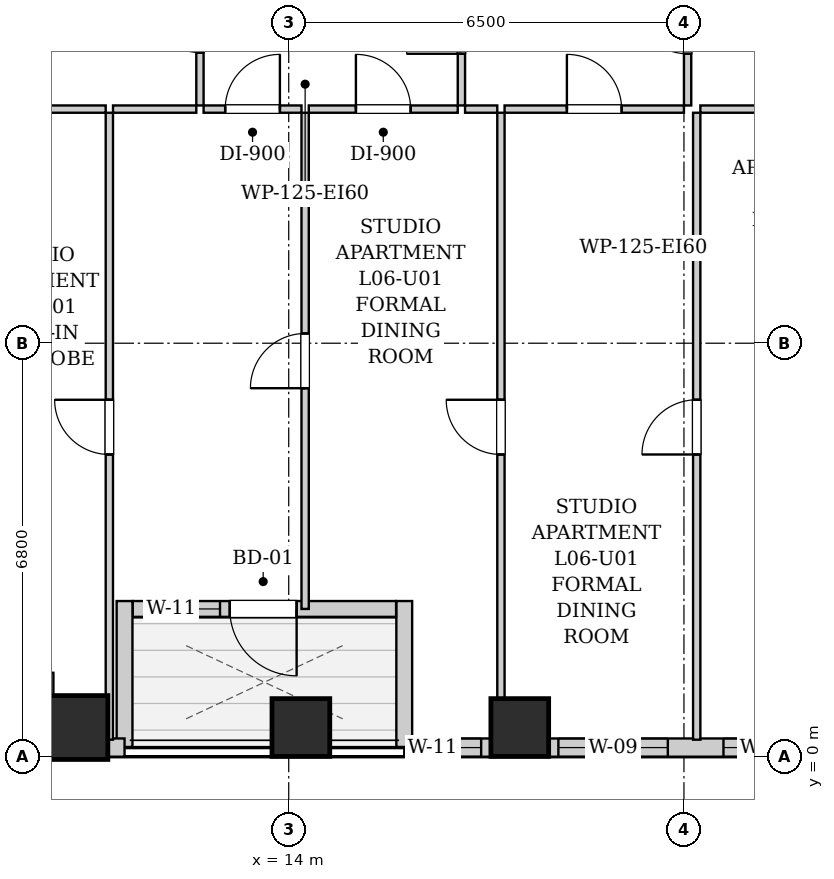
"""IFC4 building model, lengths in metres.
Left out: names, types, materials, properties, quantities, classifications, styles, units other than length and angle.
Written with IfcOpenShell. Run it as: python <this file> out.ifc"""

import sys

from ifc_helpers import new_model, si_unit, direction, frame, frame_2d, origin, origin_2d, place, context, subcontext, project, spatial, rectangle, extrude, element, fill, save


model = new_model("IFC4")
c1 = context("Model", 3, precision=1e-05, world=origin(), true_north=direction((0.0, 1.0)))
c2 = subcontext(c1, "Body", "Model", "MODEL_VIEW")
j1 = project(units=[si_unit("LENGTHUNIT", "METRE"), si_unit("PLANEANGLEUNIT", "RADIAN")], contexts=[c1])
p1 = place(None, origin())
s1 = spatial("IfcSite", under=j1, at=p1, CompositionType="ELEMENT")
p2 = place(p1, origin())
s2 = spatial("IfcBuilding", under=s1, at=p2, CompositionType="ELEMENT")
p3 = place(p2, frame((0.0, 0.0, 29.0)))
s3 = spatial("IfcBuildingStorey", under=s2, at=p3, CompositionType="ELEMENT", Elevation=29.0)
p4 = place(p3, frame((10.5, 0.48, 0.0), z_axis=(0.0, 0.0, 1.0), x_axis=(1.0, 0.0, 0.0)))
e1 = element("IfcColumn", 1, at=p4, inside=s3, PredefinedType="COLUMN", context=c2, shape_type="SweptSolid", body=[
    extrude(rectangle(XDim=1.05, YDim=1.05, at=origin_2d()), origin(), (0.0, 0.0, 1.0), 3.2),
])
for number, where, z_axis, x_axis in (
    (2, (14.2, 0.48, 0.0), (0.0, 0.0, 1.0), (1.0, 0.0, 0.0)),
    (3, (17.8, 0.48, 0.0), (0.0, 0.0, 1.0), (1.0, 0.0, 0.0)),
):
    element("IfcColumn", number, at=place(p3, frame(where, z_axis=z_axis, x_axis=x_axis)), inside=s3, PredefinedType="COLUMN", context=c2, shape_type="SweptSolid", body=[
        extrude(rectangle(XDim=0.95, YDim=0.95, at=origin_2d()), origin(), (0.0, 0.0, 1.0), 3.2),
    ])
p5 = place(p3, frame((44.0, 0.15, 0.0), z_axis=(0.0, 0.0, 1.0), x_axis=(-1.0, 0.0, 0.0)))
e4 = element("IfcWall", 4, at=p5, inside=s3, PredefinedType="SOLIDWALL", context=c2, shape_type="SweptSolid", body=[
    extrude(rectangle(XDim=28.1, YDim=0.3, at=frame_2d((14.05, 0.0))), origin(), (0.0, 0.0, 1.0), 1.975),
])
p6 = place(p5, frame((26.835, 0.0, 0.55)))
e5 = element("IfcOpeningElement", 5, at=p6, cuts=e4, PredefinedType="OPENING", context=c2, shape_type="SweptSolid", body=[
    extrude(rectangle(XDim=0.85, YDim=1.2, at=frame_2d((0.425, 0.6))), frame((0.0, 0.16, 0.0), z_axis=(0.0, -1.0, 0.0), x_axis=(1.0, 0.0, 0.0)), (0.0, 0.0, 1.0), 0.32),
])
p7 = place(p5, frame((23.765, 0.0, 0.55)))
e6 = element("IfcOpeningElement", 6, at=p7, cuts=e4, PredefinedType="OPENING", context=c2, shape_type="SweptSolid", body=[
    extrude(rectangle(XDim=1.8, YDim=1.2, at=frame_2d((0.9, 0.6))), frame((0.0, 0.16, 0.0), z_axis=(0.0, -1.0, 0.0), x_axis=(1.0, 0.0, 0.0)), (0.0, 0.0, 1.0), 0.32),
])
p8 = place(p5, frame((21.5, 0.0, 0.55)))
e7 = element("IfcOpeningElement", 7, at=p8, cuts=e4, PredefinedType="OPENING", context=c2, shape_type="SweptSolid", body=[
    extrude(rectangle(XDim=1.35, YDim=1.2, at=frame_2d((0.675, 0.6))), frame((0.0, 0.16, 0.0), z_axis=(0.0, -1.0, 0.0), x_axis=(1.0, 0.0, 0.0)), (0.0, 0.0, 1.0), 0.32),
])
p9 = place(p5, frame((14.352, 0.0, 0.55)))
e8 = element("IfcOpeningElement", 8, at=p9, cuts=e4, PredefinedType="OPENING", context=c2, shape_type="SweptSolid", body=[
    extrude(rectangle(XDim=1.8, YDim=1.2, at=frame_2d((0.9, 0.6))), frame((0.0, 0.16, 0.0), z_axis=(0.0, -1.0, 0.0), x_axis=(1.0, 0.0, 0.0)), (0.0, 0.0, 1.0), 0.32),
])
p10 = place(p5, frame((11.435, 0.0, 0.55)))
e9 = element("IfcOpeningElement", 9, at=p10, cuts=e4, PredefinedType="OPENING", context=c2, shape_type="SweptSolid", body=[
    extrude(rectangle(XDim=1.8, YDim=1.2, at=frame_2d((0.9, 0.6))), frame((0.0, 0.16, 0.0), z_axis=(0.0, -1.0, 0.0), x_axis=(1.0, 0.0, 0.0)), (0.0, 0.0, 1.0), 0.32),
])
p11 = place(p5, frame((7.891, 0.0, 0.55)))
e10 = element("IfcOpeningElement", 10, at=p11, cuts=e4, PredefinedType="OPENING", context=c2, shape_type="SweptSolid", body=[
    extrude(rectangle(XDim=1.8, YDim=1.2, at=frame_2d((0.9, 0.6))), frame((0.0, 0.16, 0.0), z_axis=(0.0, -1.0, 0.0), x_axis=(1.0, 0.0, 0.0)), (0.0, 0.0, 1.0), 0.32),
])
p12 = place(p5, frame((4.315, 0.0, 0.55)))
e11 = element("IfcOpeningElement", 11, at=p12, cuts=e4, PredefinedType="OPENING", context=c2, shape_type="SweptSolid", body=[
    extrude(rectangle(XDim=0.85, YDim=1.2, at=frame_2d((0.425, 0.6))), frame((0.0, 0.16, 0.0), z_axis=(0.0, -1.0, 0.0), x_axis=(1.0, 0.0, 0.0)), (0.0, 0.0, 1.0), 0.32),
])
p13 = place(p3, frame((15.9, 0.16, 0.0), z_axis=(0.0, 0.0, 1.0), x_axis=(0.0, 1.0, 0.0)))
e12 = element("IfcWall", 12, at=p13, inside=s3, PredefinedType="SOLIDWALL", context=c2, shape_type="SweptSolid", body=[
    extrude(rectangle(XDim=2.4, YDim=0.26, at=frame_2d((1.2, 0.0))), origin(), (0.0, 0.0, 1.0), 2.94),
])
p14 = place(p3, frame((15.766, 2.43, 0.0), z_axis=(0.0, 0.0, 1.0), x_axis=(-1.0, 0.0, 0.0)))
e13 = element("IfcWall", 13, at=p14, inside=s3, PredefinedType="SOLIDWALL", context=c2, shape_type="SweptSolid", body=[
    extrude(rectangle(XDim=4.332, YDim=0.26, at=frame_2d((2.166, 0.0))), origin(), (0.0, 0.0, 1.0), 2.94),
])
p15 = place(p14, frame((1.636, 0.0, 0.0)))
e14 = element("IfcOpeningElement", 14, at=p15, cuts=e13, PredefinedType="OPENING", context=c2, shape_type="SweptSolid", body=[
    extrude(rectangle(XDim=1.1, YDim=2.0, at=frame_2d((0.55, 1.0))), frame((0.0, 0.14, 0.0), z_axis=(0.0, -1.0, 0.0), x_axis=(1.0, 0.0, 0.0)), (0.0, 0.0, 1.0), 0.28),
])
p16 = place(p14, frame((2.896, 0.0, 0.55)))
e15 = element("IfcOpeningElement", 15, at=p16, cuts=e13, PredefinedType="OPENING", context=c2, shape_type="SweptSolid", body=[
    extrude(rectangle(XDim=0.85, YDim=1.2, at=frame_2d((0.425, 0.6))), frame((0.0, 0.14, 0.0), z_axis=(0.0, -1.0, 0.0), x_axis=(1.0, 0.0, 0.0)), (0.0, 0.0, 1.0), 0.28),
])
p17 = place(p3, frame((11.3, 2.56, 0.0), z_axis=(0.0, 0.0, 1.0), x_axis=(0.0, -1.0, 0.0)))
e16 = element("IfcWall", 16, at=p17, inside=s3, PredefinedType="SOLIDWALL", context=c2, shape_type="SweptSolid", body=[
    extrude(rectangle(XDim=2.4, YDim=0.26, at=frame_2d((1.2, 0.0))), origin(), (0.0, 0.0, 1.0), 2.94),
])
p18 = place(p3, frame((11.3, 0.15, 0.0), z_axis=(0.0, 0.0, 1.0), x_axis=(-1.0, 0.0, 0.0)))
e17 = element("IfcWall", 17, at=p18, inside=s3, PredefinedType="SOLIDWALL", context=c2, shape_type="SweptSolid", body=[
    extrude(rectangle(XDim=1.3, YDim=0.3, at=frame_2d((0.65, 0.0))), origin(), (0.0, 0.0, 1.0), 1.975),
])
p19 = place(p3, frame((10.0, 0.302, 0.0), z_axis=(0.0, 0.0, 1.0), x_axis=(0.0, 1.0, 0.0)))
e18 = element("IfcWall", 18, at=p19, inside=s3, PredefinedType="SOLIDWALL", context=c2, shape_type="SweptSolid", body=[
    extrude(rectangle(XDim=1.078, YDim=0.26, at=frame_2d((0.539, 0.0))), origin(), (0.0, 0.0, 1.0), 2.94),
])
p20 = place(p3, frame((12.54, 10.71, 0.0), z_axis=(0.0, 0.0, 1.0), x_axis=(0.0, 1.0, 0.0)))
e19 = element("IfcWall", 19, at=p20, inside=s3, PredefinedType="PARTITIONING", context=c2, shape_type="SweptSolid", body=[
    extrude(rectangle(XDim=2.6, YDim=0.12, at=frame_2d((1.3, 0.0))), origin(), (0.0, 0.0, 1.0), 2.94),
])
p21 = place(p20, frame((0.87, 0.0, 0.0)))
e20 = element("IfcOpeningElement", 20, at=p21, cuts=e19, PredefinedType="OPENING", context=c2, shape_type="SweptSolid", body=[
    extrude(rectangle(XDim=0.86, YDim=2.05, at=frame_2d((0.43, 1.025))), frame((0.0, 0.07, 0.0), z_axis=(0.0, -1.0, 0.0), x_axis=(1.0, 0.0, 0.0)), (0.0, 0.0, 1.0), 0.14),
])
p22 = place(p3, frame((10.08, 10.65, 0.0), z_axis=(0.0, 0.0, 1.0), x_axis=(1.0, 0.0, 0.0)))
e21 = element("IfcWall", 21, at=p22, inside=s3, PredefinedType="PARTITIONING", context=c2, shape_type="SweptSolid", body=[
    extrude(rectangle(XDim=0.91, YDim=0.12, at=frame_2d((0.455, 0.0))), origin(), (0.0, 0.0, 1.0), 2.94),
])
p23 = place(p3, frame((11.11, 10.65, 0.0), z_axis=(0.0, 0.0, 1.0), x_axis=(1.0, 0.0, 0.0)))
e22 = element("IfcWall", 22, at=p23, inside=s3, PredefinedType="PARTITIONING", context=c2, shape_type="SweptSolid", body=[
    extrude(rectangle(XDim=1.37, YDim=0.12, at=frame_2d((0.685, 0.0))), origin(), (0.0, 0.0, 1.0), 2.94),
])
p24 = place(p3, frame((16.84, 10.71, 0.0), z_axis=(0.0, 0.0, 1.0), x_axis=(0.0, 1.0, 0.0)))
e23 = element("IfcWall", 23, at=p24, inside=s3, PredefinedType="PARTITIONING", context=c2, shape_type="SweptSolid", body=[
    extrude(rectangle(XDim=2.6, YDim=0.12, at=frame_2d((1.3, 0.0))), origin(), (0.0, 0.0, 1.0), 2.94),
])
p25 = place(p24, frame((0.85, 0.0, 0.0)))
e24 = element("IfcOpeningElement", 24, at=p25, cuts=e23, PredefinedType="OPENING", context=c2, shape_type="SweptSolid", body=[
    extrude(rectangle(XDim=0.9, YDim=2.05, at=frame_2d((0.45, 1.025))), frame((0.0, 0.07, 0.0), z_axis=(0.0, -1.0, 0.0), x_axis=(1.0, 0.0, 0.0)), (0.0, 0.0, 1.0), 0.14),
])
p26 = place(p3, frame((12.6, 10.65, 0.0), z_axis=(0.0, 0.0, 1.0), x_axis=(1.0, 0.0, 0.0)))
e25 = element("IfcWall", 25, at=p26, inside=s3, PredefinedType="PARTITIONING", context=c2, shape_type="SweptSolid", body=[
    extrude(rectangle(XDim=1.61, YDim=0.12, at=frame_2d((0.805, 0.0))), origin(), (0.0, 0.0, 1.0), 2.94),
])
p27 = place(p26, frame((0.355, 0.0, 0.0)))
e26 = element("IfcOpeningElement", 26, at=p27, cuts=e25, PredefinedType="OPENING", context=c2, shape_type="SweptSolid", body=[
    extrude(rectangle(XDim=0.9, YDim=2.05, at=frame_2d((0.45, 1.025))), frame((0.0, 0.07, 0.0), z_axis=(0.0, -1.0, 0.0), x_axis=(1.0, 0.0, 0.0)), (0.0, 0.0, 1.0), 0.14),
])
p28 = place(p3, frame((14.33, 10.65, 0.0), z_axis=(0.0, 0.0, 1.0), x_axis=(1.0, 0.0, 0.0)))
e27 = element("IfcWall", 27, at=p28, inside=s3, PredefinedType="PARTITIONING", context=c2, shape_type="SweptSolid", body=[
    extrude(rectangle(XDim=2.45, YDim=0.12, at=frame_2d((1.225, 0.0))), origin(), (0.0, 0.0, 1.0), 2.94),
])
p29 = place(p28, frame((0.775, 0.0, 0.0)))
e28 = element("IfcOpeningElement", 28, at=p29, cuts=e27, PredefinedType="OPENING", context=c2, shape_type="SweptSolid", body=[
    extrude(rectangle(XDim=0.9, YDim=2.05, at=frame_2d((0.45, 1.025))), frame((0.0, 0.07, 0.0), z_axis=(0.0, -1.0, 0.0), x_axis=(1.0, 0.0, 0.0)), (0.0, 0.0, 1.0), 0.14),
])
p30 = place(p3, frame((20.56, 10.71, 0.0), z_axis=(0.0, 0.0, 1.0), x_axis=(0.0, 1.0, 0.0)))
e29 = element("IfcWall", 29, at=p30, inside=s3, PredefinedType="PARTITIONING", context=c2, shape_type="SweptSolid", body=[
    extrude(rectangle(XDim=2.6, YDim=0.12, at=frame_2d((1.3, 0.0))), origin(), (0.0, 0.0, 1.0), 2.94),
])
p31 = place(p30, frame((0.85, 0.0, 0.0)))
e30 = element("IfcOpeningElement", 30, at=p31, cuts=e29, PredefinedType="OPENING", context=c2, shape_type="SweptSolid", body=[
    extrude(rectangle(XDim=0.9, YDim=2.05, at=frame_2d((0.45, 1.025))), frame((0.0, 0.07, 0.0), z_axis=(0.0, -1.0, 0.0), x_axis=(1.0, 0.0, 0.0)), (0.0, 0.0, 1.0), 0.14),
])
p32 = place(p3, frame((16.9, 10.65, 0.0), z_axis=(0.0, 0.0, 1.0), x_axis=(1.0, 0.0, 0.0)))
e31 = element("IfcWall", 31, at=p32, inside=s3, PredefinedType="PARTITIONING", context=c2, shape_type="SweptSolid", body=[
    extrude(rectangle(XDim=0.53, YDim=0.12, at=frame_2d((0.265, 0.0))), origin(), (0.0, 0.0, 1.0), 2.94),
])
p33 = place(p3, frame((17.55, 10.65, 0.0), z_axis=(0.0, 0.0, 1.0), x_axis=(1.0, 0.0, 0.0)))
e32 = element("IfcWall", 32, at=p33, inside=s3, PredefinedType="PARTITIONING", context=c2, shape_type="SweptSolid", body=[
    extrude(rectangle(XDim=2.95, YDim=0.12, at=frame_2d((1.475, 0.0))), origin(), (0.0, 0.0, 1.0), 2.94),
])
p34 = place(p33, frame((1.025, 0.0, 0.0)))
e33 = element("IfcOpeningElement", 33, at=p34, cuts=e32, PredefinedType="OPENING", context=c2, shape_type="SweptSolid", body=[
    extrude(rectangle(XDim=0.9, YDim=2.05, at=frame_2d((0.45, 1.025))), frame((0.0, 0.07, 0.0), z_axis=(0.0, -1.0, 0.0), x_axis=(1.0, 0.0, 0.0)), (0.0, 0.0, 1.0), 0.14),
])
p35 = place(p3, frame((20.77, 10.65, 0.0), z_axis=(0.0, 0.0, 1.0), x_axis=(1.0, 0.0, 0.0)))
e34 = element("IfcWall", 34, at=p35, inside=s3, PredefinedType="PARTITIONING", context=c2, shape_type="SweptSolid", body=[
    extrude(rectangle(XDim=3.0, YDim=0.12, at=frame_2d((1.5, 0.0))), origin(), (0.0, 0.0, 1.0), 2.94),
])
p36 = place(p35, frame((1.05, 0.0, 0.0)))
e35 = element("IfcOpeningElement", 35, at=p36, cuts=e34, PredefinedType="OPENING", context=c2, shape_type="SweptSolid", body=[
    extrude(rectangle(XDim=0.9, YDim=2.05, at=frame_2d((0.45, 1.025))), frame((0.0, 0.07, 0.0), z_axis=(0.0, -1.0, 0.0), x_axis=(1.0, 0.0, 0.0)), (0.0, 0.0, 1.0), 0.14),
])
p37 = place(p3, frame((11.05, 0.28, 0.0), z_axis=(0.0, 0.0, 1.0), x_axis=(0.0, 1.0, 0.0)))
e36 = element("IfcWall", 36, at=p37, inside=s3, PredefinedType="PARTITIONING", context=c2, shape_type="SweptSolid", body=[
    extrude(rectangle(XDim=10.31, YDim=0.12, at=frame_2d((5.155, 0.0))), origin(), (0.0, 0.0, 1.0), 2.94),
])
p38 = place(p37, frame((4.69, 0.0, 0.0)))
e37 = element("IfcOpeningElement", 37, at=p38, cuts=e36, PredefinedType="OPENING", context=c2, shape_type="SweptSolid", body=[
    extrude(rectangle(XDim=0.9, YDim=2.05, at=frame_2d((0.45, 1.025))), frame((0.0, 0.07, 0.0), z_axis=(0.0, -1.0, 0.0), x_axis=(1.0, 0.0, 0.0)), (0.0, 0.0, 1.0), 0.14),
])
p39 = place(p3, frame((14.27, 2.43, 0.0), z_axis=(0.0, 0.0, 1.0), x_axis=(0.0, 1.0, 0.0)))
e38 = element("IfcWall", 38, at=p39, inside=s3, PredefinedType="PARTITIONING", context=c2, shape_type="SweptSolid", body=[
    extrude(rectangle(XDim=8.16, YDim=0.12, at=frame_2d((4.08, 0.0))), origin(), (0.0, 0.0, 1.0), 2.94),
])
p40 = place(p39, frame((3.63, 0.0, 0.0)))
e39 = element("IfcOpeningElement", 39, at=p40, cuts=e38, PredefinedType="OPENING", context=c2, shape_type="SweptSolid", body=[
    extrude(rectangle(XDim=0.9, YDim=2.05, at=frame_2d((0.45, 1.025))), frame((0.0, 0.07, 0.0), z_axis=(0.0, -1.0, 0.0), x_axis=(1.0, 0.0, 0.0)), (0.0, 0.0, 1.0), 0.14),
])
p41 = place(p3, frame((17.49, 0.28, 0.0), z_axis=(0.0, 0.0, 1.0), x_axis=(0.0, 1.0, 0.0)))
e40 = element("IfcWall", 40, at=p41, inside=s3, PredefinedType="PARTITIONING", context=c2, shape_type="SweptSolid", body=[
    extrude(rectangle(XDim=10.31, YDim=0.12, at=frame_2d((5.155, 0.0))), origin(), (0.0, 0.0, 1.0), 2.94),
])
p42 = place(p41, frame((4.69, 0.0, 0.0)))
e41 = element("IfcOpeningElement", 41, at=p42, cuts=e40, PredefinedType="OPENING", context=c2, shape_type="SweptSolid", body=[
    extrude(rectangle(XDim=0.9, YDim=2.05, at=frame_2d((0.45, 1.025))), frame((0.0, 0.07, 0.0), z_axis=(0.0, -1.0, 0.0), x_axis=(1.0, 0.0, 0.0)), (0.0, 0.0, 1.0), 0.14),
])
p43 = place(p3, frame((20.71, 0.28, 0.0), z_axis=(0.0, 0.0, 1.0), x_axis=(0.0, 1.0, 0.0)))
e42 = element("IfcWall", 42, at=p43, inside=s3, PredefinedType="PARTITIONING", context=c2, shape_type="SweptSolid", body=[
    extrude(rectangle(XDim=10.31, YDim=0.12, at=frame_2d((5.155, 0.0))), origin(), (0.0, 0.0, 1.0), 2.94),
])
p44 = place(p43, frame((4.69, 0.0, 0.0)))
e43 = element("IfcOpeningElement", 43, at=p44, cuts=e42, PredefinedType="OPENING", context=c2, shape_type="SweptSolid", body=[
    extrude(rectangle(XDim=0.9, YDim=2.05, at=frame_2d((0.45, 1.025))), frame((0.0, 0.07, 0.0), z_axis=(0.0, -1.0, 0.0), x_axis=(1.0, 0.0, 0.0)), (0.0, 0.0, 1.0), 0.14),
])
p45 = place(p21, origin())
e44 = element("IfcDoor", 44, at=p45, inside=s3, OperationType="SINGLE_SWING_RIGHT", PredefinedType="DOOR", context=c2, shape_type="SweptSolid", body=[
    extrude(rectangle(XDim=0.86, YDim=2.05, at=frame_2d((0.43, 1.025))), frame((0.0, 0.025, 0.0), z_axis=(0.0, -1.0, 0.0), x_axis=(1.0, 0.0, 0.0)), (0.0, 0.0, 1.0), 0.05),
])
fill(e20, e44)
p46 = place(p25, origin())
e45 = element("IfcDoor", 45, at=p46, inside=s3, OperationType="SINGLE_SWING_LEFT", PredefinedType="DOOR", context=c2, shape_type="SweptSolid", body=[
    extrude(rectangle(XDim=0.9, YDim=2.05, at=frame_2d((0.45, 1.025))), frame((0.0, 0.025, 0.0), z_axis=(0.0, -1.0, 0.0), x_axis=(1.0, 0.0, 0.0)), (0.0, 0.0, 1.0), 0.05),
])
fill(e24, e45)
p47 = place(p27, origin())
e46 = element("IfcDoor", 46, at=p47, inside=s3, OperationType="SINGLE_SWING_RIGHT", PredefinedType="DOOR", context=c2, shape_type="SweptSolid", body=[
    extrude(rectangle(XDim=0.9, YDim=2.05, at=frame_2d((0.45, 1.025))), frame((0.0, 0.025, 0.0), z_axis=(0.0, -1.0, 0.0), x_axis=(1.0, 0.0, 0.0)), (0.0, 0.0, 1.0), 0.05),
])
fill(e26, e46)
p48 = place(p29, origin())
e47 = element("IfcDoor", 47, at=p48, inside=s3, OperationType="SINGLE_SWING_LEFT", PredefinedType="DOOR", context=c2, shape_type="SweptSolid", body=[
    extrude(rectangle(XDim=0.9, YDim=2.05, at=frame_2d((0.45, 1.025))), frame((0.0, 0.025, 0.0), z_axis=(0.0, -1.0, 0.0), x_axis=(1.0, 0.0, 0.0)), (0.0, 0.0, 1.0), 0.05),
])
fill(e28, e47)
p49 = place(p31, origin())
e48 = element("IfcDoor", 48, at=p49, inside=s3, OperationType="SINGLE_SWING_RIGHT", PredefinedType="DOOR", context=c2, shape_type="SweptSolid", body=[
    extrude(rectangle(XDim=0.9, YDim=2.05, at=frame_2d((0.45, 1.025))), frame((0.0, 0.025, 0.0), z_axis=(0.0, -1.0, 0.0), x_axis=(1.0, 0.0, 0.0)), (0.0, 0.0, 1.0), 0.05),
])
fill(e30, e48)
p50 = place(p34, origin())
e49 = element("IfcDoor", 49, at=p50, inside=s3, OperationType="SINGLE_SWING_LEFT", PredefinedType="DOOR", context=c2, shape_type="SweptSolid", body=[
    extrude(rectangle(XDim=0.9, YDim=2.05, at=frame_2d((0.45, 1.025))), frame((0.0, 0.025, 0.0), z_axis=(0.0, -1.0, 0.0), x_axis=(1.0, 0.0, 0.0)), (0.0, 0.0, 1.0), 0.05),
])
fill(e33, e49)
p51 = place(p38, origin())
e50 = element("IfcDoor", 50, at=p51, inside=s3, OperationType="SINGLE_SWING_RIGHT", PredefinedType="DOOR", context=c2, shape_type="SweptSolid", body=[
    extrude(rectangle(XDim=0.9, YDim=2.05, at=frame_2d((0.45, 1.025))), frame((0.0, 0.025, 0.0), z_axis=(0.0, -1.0, 0.0), x_axis=(1.0, 0.0, 0.0)), (0.0, 0.0, 1.0), 0.05),
])
fill(e37, e50)
p52 = place(p40, origin())
e51 = element("IfcDoor", 51, at=p52, inside=s3, OperationType="SINGLE_SWING_LEFT", PredefinedType="DOOR", context=c2, shape_type="SweptSolid", body=[
    extrude(rectangle(XDim=0.9, YDim=2.05, at=frame_2d((0.45, 1.025))), frame((0.0, 0.025, 0.0), z_axis=(0.0, -1.0, 0.0), x_axis=(1.0, 0.0, 0.0)), (0.0, 0.0, 1.0), 0.05),
])
fill(e39, e51)
p53 = place(p42, origin())
e52 = element("IfcDoor", 52, at=p53, inside=s3, OperationType="SINGLE_SWING_RIGHT", PredefinedType="DOOR", context=c2, shape_type="SweptSolid", body=[
    extrude(rectangle(XDim=0.9, YDim=2.05, at=frame_2d((0.45, 1.025))), frame((0.0, 0.025, 0.0), z_axis=(0.0, -1.0, 0.0), x_axis=(1.0, 0.0, 0.0)), (0.0, 0.0, 1.0), 0.05),
])
fill(e41, e52)
p54 = place(p44, origin())
e53 = element("IfcDoor", 53, at=p54, inside=s3, OperationType="SINGLE_SWING_LEFT", PredefinedType="DOOR", context=c2, shape_type="SweptSolid", body=[
    extrude(rectangle(XDim=0.9, YDim=2.05, at=frame_2d((0.45, 1.025))), frame((0.0, 0.025, 0.0), z_axis=(0.0, -1.0, 0.0), x_axis=(1.0, 0.0, 0.0)), (0.0, 0.0, 1.0), 0.05),
])
fill(e43, e53)
p55 = place(p15, origin())
e54 = element("IfcDoor", 54, at=p55, inside=s3, OperationType="SINGLE_SWING_LEFT", PredefinedType="DOOR", context=c2, shape_type="SweptSolid", body=[
    extrude(rectangle(XDim=1.1, YDim=2.0, at=frame_2d((0.55, 1.0))), frame((0.0, 0.025, 0.0), z_axis=(0.0, -1.0, 0.0), x_axis=(1.0, 0.0, 0.0)), (0.0, 0.0, 1.0), 0.05),
])
fill(e14, e54)
p56 = place(p16, origin())
e55 = element("IfcWindow", 55, at=p56, inside=s3, PartitioningType="SINGLE_PANEL", PredefinedType="WINDOW", context=c2, shape_type="SweptSolid", body=[
    extrude(rectangle(XDim=0.85, YDim=1.2, at=frame_2d((0.425, 0.6))), frame((0.0, 0.03, 0.0), z_axis=(0.0, -1.0, 0.0), x_axis=(1.0, 0.0, 0.0)), (0.0, 0.0, 1.0), 0.06),
])
fill(e15, e55)
p57 = place(p6, origin())
e56 = element("IfcWindow", 56, at=p57, inside=s3, PartitioningType="SINGLE_PANEL", PredefinedType="WINDOW", context=c2, shape_type="SweptSolid", body=[
    extrude(rectangle(XDim=0.85, YDim=1.2, at=frame_2d((0.425, 0.6))), frame((0.0, 0.03, 0.0), z_axis=(0.0, -1.0, 0.0), x_axis=(1.0, 0.0, 0.0)), (0.0, 0.0, 1.0), 0.06),
])
fill(e5, e56)
p58 = place(p7, origin())
e57 = element("IfcWindow", 57, at=p58, inside=s3, PartitioningType="DOUBLE_PANEL_VERTICAL", PredefinedType="WINDOW", context=c2, shape_type="SweptSolid", body=[
    extrude(rectangle(XDim=1.8, YDim=1.2, at=frame_2d((0.9, 0.6))), frame((0.0, 0.03, 0.0), z_axis=(0.0, -1.0, 0.0), x_axis=(1.0, 0.0, 0.0)), (0.0, 0.0, 1.0), 0.06),
])
fill(e6, e57)
p59 = place(p8, origin())
e58 = element("IfcWindow", 58, at=p59, inside=s3, PartitioningType="SINGLE_PANEL", PredefinedType="WINDOW", context=c2, shape_type="SweptSolid", body=[
    extrude(rectangle(XDim=1.35, YDim=1.2, at=frame_2d((0.675, 0.6))), frame((0.0, 0.03, 0.0), z_axis=(0.0, -1.0, 0.0), x_axis=(1.0, 0.0, 0.0)), (0.0, 0.0, 1.0), 0.06),
])
fill(e7, e58)
save(model, sys.argv[1])
